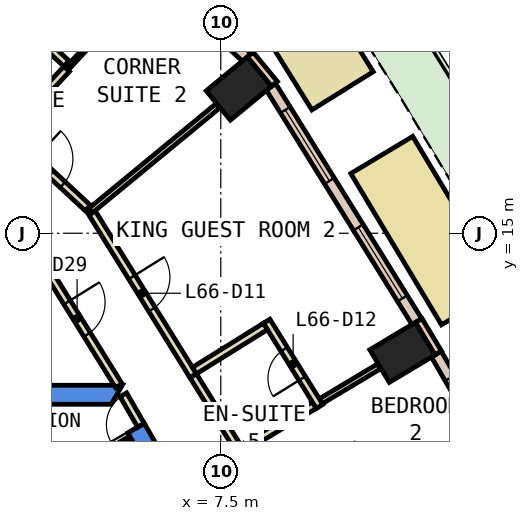
"""IFC4 building model, lengths in metres.
Left out: names, types, materials, properties, quantities, classifications, styles, units other than length and angle.
Written with IfcOpenShell. Run it as: python <this file> out.ifc"""

import sys

from ifc_helpers import new_model, si_unit, direction, frame, frame_2d, origin, origin_2d, place, context, subcontext, project, spatial, polyline, rectangle, outline, extrude, element, fill, save


model = new_model("IFC4")
c1 = context("Model", 3, precision=1e-05, world=origin(), true_north=direction((0.0, 1.0)))
c2 = subcontext(c1, "Body", "Model", "MODEL_VIEW")
j1 = project(units=[si_unit("LENGTHUNIT", "METRE"), si_unit("PLANEANGLEUNIT", "RADIAN")], contexts=[c1])
p1 = place(None, origin())
s1 = spatial("IfcSite", under=j1, at=p1, CompositionType="ELEMENT")
p2 = place(p1, origin())
s2 = spatial("IfcBuilding", under=s1, at=p2, CompositionType="ELEMENT")
p3 = place(p2, frame((0.0, 0.0, 286.4)))
s3 = spatial("IfcBuildingStorey", under=s2, at=p3, CompositionType="ELEMENT", Elevation=286.4)
for number, where, z_axis, x_axis in (
    (1, (12.279, 11.865, 0.0), (0.0, 0.0, 1.0), (-0.514, 0.858, 0.0)),
    (2, (7.975, 18.807, 0.0), (0.0, 0.0, 1.0), (-0.636, 0.772, 0.0)),
):
    element("IfcColumn", number, at=place(p3, frame(where, z_axis=z_axis, x_axis=x_axis)), inside=s3, PredefinedType="COLUMN", context=c2, shape_type="SweptSolid", body=[
        extrude(rectangle(XDim=1.0, YDim=1.4, at=origin_2d()), origin(), (0.0, 0.0, 1.0), 3.26),
    ])
p4 = place(p3, frame((0.0, 0.0, -0.6)))
e3 = element("IfcWall", 3, at=p4, inside=s3, PredefinedType="SHEAR", context=c2, shape_type="SweptSolid", body=[
    extrude(outline(polyline([(5.486, 9.998), (5.053, 9.748), (9.238, 2.5), (9.815, 2.5), (5.486, 9.998)])), origin(), (0.0, 0.0, 1.0), 3.86),
])
p5 = place(p3, frame((0.0, 0.0, -0.6)))
e4 = element("IfcWall", 4, at=p5, inside=s3, PredefinedType="SHEAR", context=c2, shape_type="SweptSolid", body=[
    extrude(outline(polyline([(4.907, 11.0), (-4.907, 11.0), (-4.619, 10.5), (4.619, 10.5), (4.907, 11.0)])), origin(), (0.0, 0.0, 1.0), 3.86),
])
for number, where, z_axis, x_axis in (
    (5, (13.222, 11.848, 0.0), (0.0, 0.0, 1.0), (-0.514, 0.858, 0.0)),
    (6, (8.911, 18.929, 0.0), (0.0, 0.0, 1.0), (-0.636, 0.772, 0.0)),
):
    element("IfcWall", number, at=place(p3, frame(where, z_axis=z_axis, x_axis=x_axis)), inside=s3, PredefinedType="STANDARD", context=c2, shape_type="SweptSolid", body=[
        extrude(rectangle(XDim=1.0, YDim=0.2, at=frame_2d((0.5, 0.0))), origin(), (0.0, 0.0, 1.0), 3.26),
    ])
p6 = place(p3, frame((16.821, 5.498, 0.0), z_axis=(0.0, 0.0, 1.0), x_axis=(-0.499945412946, 0.866056917341, 0.0)))
e7 = element("IfcWall", 7, at=p6, inside=s3, PredefinedType="STANDARD", context=c2, shape_type="SweptSolid", body=[
    extrude(rectangle(XDim=7.299, YDim=0.3, at=frame_2d((3.649, 0.0))), origin(), (0.0, 0.0, 1.0), 3.26),
])
p7 = place(p6, frame((0.825, 0.0, 0.0)))
e8 = element("IfcOpeningElement", 8, at=p7, cuts=e7, PredefinedType="OPENING", context=c2, shape_type="SweptSolid", body=[
    extrude(rectangle(XDim=2.0, YDim=2.4, at=frame_2d((1.0, 1.2))), frame((0.0, 0.16, 0.0), z_axis=(0.0, -1.0, 0.0), x_axis=(1.0, 0.0, 0.0)), (0.0, 0.0, 1.0), 0.32),
])
p8 = place(p6, frame((4.374, 0.0, 0.9)))
e9 = element("IfcOpeningElement", 9, at=p8, cuts=e7, PredefinedType="OPENING", context=c2, shape_type="SweptSolid", body=[
    extrude(rectangle(XDim=2.2, YDim=2.0, at=frame_2d((1.1, 1.0))), frame((0.0, 0.16, 0.0), z_axis=(0.0, -1.0, 0.0), x_axis=(1.0, 0.0, 0.0)), (0.0, 0.0, 1.0), 0.32),
])
p9 = place(p3, frame((12.659, 12.675, 0.0), z_axis=(0.0, 0.0, 1.0), x_axis=(-0.527762071678, 0.849392250788, 0.0)))
e10 = element("IfcWall", 10, at=p9, inside=s3, PredefinedType="STANDARD", context=c2, shape_type="SweptSolid", body=[
    extrude(rectangle(XDim=7.276, YDim=0.3, at=frame_2d((3.638, 0.0))), origin(), (0.0, 0.0, 1.0), 3.26),
])
p10 = place(p9, frame((0.719, 0.0, 0.9)))
e11 = element("IfcOpeningElement", 11, at=p10, cuts=e10, PredefinedType="OPENING", context=c2, shape_type="SweptSolid", body=[
    extrude(rectangle(XDim=2.2, YDim=2.0, at=frame_2d((1.1, 1.0))), frame((0.0, 0.16, 0.0), z_axis=(0.0, -1.0, 0.0), x_axis=(1.0, 0.0, 0.0)), (0.0, 0.0, 1.0), 0.32),
])
p11 = place(p9, frame((4.357, 0.0, 0.9)))
e12 = element("IfcOpeningElement", 12, at=p11, cuts=e10, PredefinedType="OPENING", context=c2, shape_type="SweptSolid", body=[
    extrude(rectangle(XDim=2.2, YDim=2.0, at=frame_2d((1.1, 1.0))), frame((0.0, 0.16, 0.0), z_axis=(0.0, -1.0, 0.0), x_axis=(1.0, 0.0, 0.0)), (0.0, 0.0, 1.0), 0.32),
])
p12 = place(p3, frame((8.184, 19.626, 0.0), z_axis=(0.0, 0.0, 1.0), x_axis=(-0.732397380344, 0.680877431896, 0.0)))
e13 = element("IfcWall", 13, at=p12, inside=s3, PredefinedType="STANDARD", context=c2, shape_type="SweptSolid", body=[
    extrude(rectangle(XDim=4.019, YDim=0.3, at=frame_2d((2.009, 0.0))), origin(), (0.0, 0.0, 1.0), 3.26),
])
p13 = place(p12, frame((1.309, 0.0, 0.9)))
e14 = element("IfcOpeningElement", 14, at=p13, cuts=e13, PredefinedType="OPENING", context=c2, shape_type="SweptSolid", body=[
    extrude(rectangle(XDim=1.4, YDim=2.0, at=frame_2d((0.7, 1.0))), frame((0.0, 0.16, 0.0), z_axis=(0.0, -1.0, 0.0), x_axis=(1.0, 0.0, 0.0)), (0.0, 0.0, 1.0), 0.32),
])
p14 = place(p3, frame((14.123, 13.079, 0.0), z_axis=(0.0, 0.0, 1.0), x_axis=(-0.514333285091, 0.857590386984, 0.0)))
e15 = element("IfcWall", 15, at=p14, inside=s3, PredefinedType="STANDARD", context=c2, shape_type="SweptSolid", body=[
    extrude(rectangle(XDim=4.641, YDim=1.9, at=frame_2d((2.32, 0.0))), origin(), (0.0, 0.0, 1.0), 0.8),
])
p15 = place(p3, frame((10.704, 18.747, 0.0), z_axis=(0.0, 0.0, 1.0), x_axis=(-0.528631074262, 0.848851687472, 0.0)))
e16 = element("IfcWall", 16, at=p15, inside=s3, PredefinedType="STANDARD", context=c2, shape_type="SweptSolid", body=[
    extrude(rectangle(XDim=4.799, YDim=1.9, at=frame_2d((2.4, 0.0))), origin(), (0.0, 0.0, 1.0), 0.8),
])
p16 = place(p3, frame((2.62, 14.526, 0.0), z_axis=(0.0, 0.0, 1.0), x_axis=(0.527726136463, -0.84941457775, 0.0)))
e17 = element("IfcWall", 17, at=p16, inside=s3, PredefinedType="PARTITIONING", context=c2, shape_type="SweptSolid", body=[
    extrude(rectangle(XDim=4.165, YDim=0.2, at=frame_2d((2.083, 0.0))), origin(), (0.0, 0.0, 1.0), 2.4),
])
p17 = place(p16, frame((1.583, 0.0, 0.0)))
e18 = element("IfcOpeningElement", 18, at=p17, cuts=e17, PredefinedType="OPENING", context=c2, shape_type="SweptSolid", body=[
    extrude(rectangle(XDim=1.0, YDim=2.1, at=frame_2d((0.5, 1.05))), frame((0.0, 0.11, 0.0), z_axis=(0.0, -1.0, 0.0), x_axis=(1.0, 0.0, 0.0)), (0.0, 0.0, 1.0), 0.22),
])
p18 = place(p3, frame((4.022, 15.68, 0.0), z_axis=(0.0, 0.0, 1.0), x_axis=(0.527737948498, -0.849407239029, 0.0)))
e19 = element("IfcWall", 19, at=p18, inside=s3, PredefinedType="PARTITIONING", context=c2, shape_type="SweptSolid", body=[
    extrude(rectangle(XDim=5.217, YDim=0.2, at=frame_2d((2.608, 0.0))), origin(), (0.0, 0.0, 1.0), 3.26),
])
p19 = place(p18, frame((2.159, 0.0, 0.0)))
e20 = element("IfcOpeningElement", 20, at=p19, cuts=e19, PredefinedType="OPENING", context=c2, shape_type="SweptSolid", body=[
    extrude(rectangle(XDim=1.0, YDim=2.1, at=frame_2d((0.5, 1.05))), frame((0.0, 0.11, 0.0), z_axis=(0.0, -1.0, 0.0), x_axis=(1.0, 0.0, 0.0)), (0.0, 0.0, 1.0), 0.22),
])
p20 = place(p3, frame((6.775, 11.249, 0.0), z_axis=(0.0, 0.0, 1.0), x_axis=(0.527803270752, -0.849366650736, 0.0)))
e21 = element("IfcWall", 21, at=p20, inside=s3, PredefinedType="PARTITIONING", context=c2, shape_type="SweptSolid", body=[
    extrude(rectangle(XDim=2.401, YDim=0.2, at=frame_2d((1.2, 0.0))), origin(), (0.0, 0.0, 1.0), 3.26),
])
p21 = place(p3, frame((1.949, 17.572, 0.0), z_axis=(0.0, 0.0, 1.0), x_axis=(0.732331154554, -0.680948661846, 0.0)))
e22 = element("IfcWall", 22, at=p21, inside=s3, PredefinedType="PARTITIONING", context=c2, shape_type="SweptSolid", body=[
    extrude(rectangle(XDim=2.803, YDim=0.2, at=frame_2d((1.402, 0.0))), origin(), (0.0, 0.0, 1.0), 3.26),
])
p22 = place(p21, frame((0.901, 0.0, 0.0)))
e23 = element("IfcOpeningElement", 23, at=p22, cuts=e22, PredefinedType="OPENING", context=c2, shape_type="SweptSolid", body=[
    extrude(rectangle(XDim=1.0, YDim=2.1, at=frame_2d((0.5, 1.05))), frame((0.0, 0.11, 0.0), z_axis=(0.0, -1.0, 0.0), x_axis=(1.0, 0.0, 0.0)), (0.0, 0.0, 1.0), 0.22),
])
p23 = place(p3, frame((10.133, 10.58, 0.0), z_axis=(0.0, 0.0, 1.0), x_axis=(0.857903919212, 0.513810145287, 0.0)))
e24 = element("IfcWall", 24, at=p23, inside=s3, PredefinedType="PARTITIONING", context=c2, shape_type="SweptSolid", body=[
    extrude(rectangle(XDim=1.781, YDim=0.15, at=frame_2d((0.891, 0.0))), origin(), (0.0, 0.0, 1.0), 3.26),
])
p24 = place(p3, frame((7.989, 9.295, 0.0), z_axis=(0.0, 0.0, 1.0), x_axis=(0.857801856135, 0.513980520654, 0.0)))
e25 = element("IfcWall", 25, at=p24, inside=s3, PredefinedType="PARTITIONING", context=c2, shape_type="SweptSolid", body=[
    extrude(rectangle(XDim=2.3, YDim=0.2, at=frame_2d((1.15, 0.0))), origin(), (0.0, 0.0, 1.0), 3.26),
])
p25 = place(p3, frame((10.1, 10.443, 0.0), z_axis=(0.0, 0.0, 1.0), x_axis=(-0.527510239672, 0.849548672555, 0.0)))
e26 = element("IfcWall", 26, at=p25, inside=s3, PredefinedType="PARTITIONING", context=c2, shape_type="SweptSolid", body=[
    extrude(rectangle(XDim=2.639, YDim=0.2, at=frame_2d((1.319, 0.0))), origin(), (0.0, 0.0, 1.0), 3.26),
])
p26 = place(p25, frame((0.869, 0.0, 0.0)))
e27 = element("IfcOpeningElement", 27, at=p26, cuts=e26, PredefinedType="OPENING", context=c2, shape_type="SweptSolid", body=[
    extrude(rectangle(XDim=0.9, YDim=2.1, at=frame_2d((0.45, 1.05))), frame((0.0, 0.11, 0.0), z_axis=(0.0, -1.0, 0.0), x_axis=(1.0, 0.0, 0.0)), (0.0, 0.0, 1.0), 0.22),
])
p27 = place(p3, frame((8.676, 12.548, 0.0), z_axis=(0.0, 0.0, 1.0), x_axis=(-0.849286670427, -0.527931957202, 0.0)))
e28 = element("IfcWall", 28, at=p27, inside=s3, PredefinedType="PARTITIONING", context=c2, shape_type="SweptSolid", body=[
    extrude(rectangle(XDim=2.199, YDim=0.2, at=frame_2d((1.1, 0.0))), origin(), (0.0, 0.0, 1.0), 3.26),
])
p28 = place(p3, frame((4.075, 15.595, 0.0), z_axis=(0.0, 0.0, 1.0), x_axis=(0.771899326406, 0.635744783616, 0.0)))
e29 = element("IfcWall", 29, at=p28, inside=s3, PredefinedType="PARTITIONING", context=c2, shape_type="SweptSolid", body=[
    extrude(rectangle(XDim=4.332, YDim=0.15, at=frame_2d((2.166, 0.0))), origin(), (0.0, 0.0, 1.0), 3.26),
])
p29 = place(p3, frame((3.444, 19.322, 0.0), z_axis=(0.0, 0.0, 1.0), x_axis=(0.68085394361, 0.732419215662, 0.0)))
e30 = element("IfcWall", 30, at=p29, inside=s3, PredefinedType="PARTITIONING", context=c2, shape_type="SweptSolid", body=[
    extrude(rectangle(XDim=3.3, YDim=0.1, at=frame_2d((1.65, 0.0))), origin(), (0.0, 0.0, 1.0), 3.26),
])
p30 = place(p29, frame((1.2, 0.0, 0.0)))
e31 = element("IfcOpeningElement", 31, at=p30, cuts=e30, PredefinedType="OPENING", context=c2, shape_type="SweptSolid", body=[
    extrude(rectangle(XDim=0.9, YDim=2.1, at=frame_2d((0.45, 1.05))), frame((0.0, 0.06, 0.0), z_axis=(0.0, -1.0, 0.0), x_axis=(1.0, 0.0, 0.0)), (0.0, 0.0, 1.0), 0.12),
])
p31 = place(p3, frame((1.776, 17.528, 0.0), z_axis=(0.0, 0.0, 1.0), x_axis=(0.680978439741, 0.732303464834, 0.0)))
e32 = element("IfcWall", 32, at=p31, inside=s3, PredefinedType="PARTITIONING", context=c2, shape_type="SweptSolid", body=[
    extrude(rectangle(XDim=2.45, YDim=0.2, at=frame_2d((1.225, 0.0))), origin(), (0.0, 0.0, 1.0), 3.26),
])
p32 = place(p3, frame((3.439, 19.464, 0.0), z_axis=(0.0, 0.0, 1.0), x_axis=(-0.732491549411, 0.68077612329, 0.0)))
e33 = element("IfcWall", 33, at=p32, inside=s3, PredefinedType="PARTITIONING", context=c2, shape_type="SweptSolid", body=[
    extrude(rectangle(XDim=1.699, YDim=0.2, at=frame_2d((0.85, 0.0))), origin(), (0.0, 0.0, 1.0), 3.26),
])
p33 = place(p3, frame((5.399, 9.948, 0.0), z_axis=(0.0, 0.0, 1.0), x_axis=(-0.499882215713, 0.866093395895, 0.0)))
e34 = element("IfcWall", 34, at=p33, inside=s3, PredefinedType="PARTITIONING", context=c2, shape_type="SweptSolid", body=[
    extrude(rectangle(XDim=0.926, YDim=0.2, at=frame_2d((0.463, 0.0))), origin(), (0.0, 0.0, 1.0), 2.4),
])
p34 = place(p33, frame((0.017, 0.0, 0.0)))
e35 = element("IfcOpeningElement", 35, at=p34, cuts=e34, PredefinedType="OPENING", context=c2, shape_type="SweptSolid", body=[
    extrude(rectangle(XDim=0.9, YDim=2.1, at=frame_2d((0.45, 1.05))), frame((0.0, 0.11, 0.0), z_axis=(0.0, -1.0, 0.0), x_axis=(1.0, 0.0, 0.0)), (0.0, 0.0, 1.0), 0.22),
])
p35 = place(p3, frame((2.7, 8.158, 0.0), z_axis=(0.0, 0.0, 1.0), x_axis=(0.86611865017, 0.499838457731, 0.0)))
e36 = element("IfcWall", 36, at=p35, inside=s3, PredefinedType="STANDARD", context=c2, shape_type="SweptSolid", body=[
    extrude(rectangle(XDim=2.733, YDim=0.2, at=frame_2d((1.366, 0.0))), origin(), (0.0, 0.0, 1.0), 3.26),
])
p36 = place(p8, origin())
e37 = element("IfcWindow", 37, at=p36, inside=s3, PartitioningType="SINGLE_PANEL", PredefinedType="WINDOW", context=c2, shape_type="SweptSolid", body=[
    extrude(rectangle(XDim=2.2, YDim=2.0, at=frame_2d((1.1, 1.0))), frame((0.0, 0.03, 0.0), z_axis=(0.0, -1.0, 0.0), x_axis=(1.0, 0.0, 0.0)), (0.0, 0.0, 1.0), 0.06),
])
fill(e9, e37)
p37 = place(p10, origin())
e38 = element("IfcWindow", 38, at=p37, inside=s3, PartitioningType="SINGLE_PANEL", PredefinedType="WINDOW", context=c2, shape_type="SweptSolid", body=[
    extrude(rectangle(XDim=2.2, YDim=2.0, at=frame_2d((1.1, 1.0))), frame((0.0, 0.03, 0.0), z_axis=(0.0, -1.0, 0.0), x_axis=(1.0, 0.0, 0.0)), (0.0, 0.0, 1.0), 0.06),
])
fill(e11, e38)
p38 = place(p11, origin())
e39 = element("IfcWindow", 39, at=p38, inside=s3, PartitioningType="SINGLE_PANEL", PredefinedType="WINDOW", context=c2, shape_type="SweptSolid", body=[
    extrude(rectangle(XDim=2.2, YDim=2.0, at=frame_2d((1.1, 1.0))), frame((0.0, 0.03, 0.0), z_axis=(0.0, -1.0, 0.0), x_axis=(1.0, 0.0, 0.0)), (0.0, 0.0, 1.0), 0.06),
])
fill(e12, e39)
p39 = place(p19, origin())
e40 = element("IfcDoor", 40, at=p39, inside=s3, OperationType="SINGLE_SWING_LEFT", PredefinedType="DOOR", context=c2, shape_type="SweptSolid", body=[
    extrude(rectangle(XDim=1.0, YDim=2.1, at=frame_2d((0.5, 1.05))), frame((0.0, 0.025, 0.0), z_axis=(0.0, -1.0, 0.0), x_axis=(1.0, 0.0, 0.0)), (0.0, 0.0, 1.0), 0.05),
])
fill(e20, e40)
p40 = place(p26, origin())
e41 = element("IfcDoor", 41, at=p40, inside=s3, OperationType="SINGLE_SWING_LEFT", PredefinedType="DOOR", context=c2, shape_type="SweptSolid", body=[
    extrude(rectangle(XDim=0.9, YDim=2.1, at=frame_2d((0.45, 1.05))), frame((0.0, 0.025, 0.0), z_axis=(0.0, -1.0, 0.0), x_axis=(1.0, 0.0, 0.0)), (0.0, 0.0, 1.0), 0.05),
])
fill(e27, e41)
p41 = place(p22, origin())
e42 = element("IfcDoor", 42, at=p41, inside=s3, OperationType="SINGLE_SWING_LEFT", PredefinedType="DOOR", context=c2, shape_type="SweptSolid", body=[
    extrude(rectangle(XDim=1.0, YDim=2.1, at=frame_2d((0.5, 1.05))), frame((0.0, 0.025, 0.0), z_axis=(0.0, -1.0, 0.0), x_axis=(1.0, 0.0, 0.0)), (0.0, 0.0, 1.0), 0.05),
])
fill(e23, e42)
p42 = place(p17, origin())
e43 = element("IfcDoor", 43, at=p42, inside=s3, OperationType="SINGLE_SWING_RIGHT", PredefinedType="DOOR", context=c2, shape_type="SweptSolid", body=[
    extrude(rectangle(XDim=1.0, YDim=2.1, at=frame_2d((0.5, 1.05))), frame((0.0, 0.025, 0.0), z_axis=(0.0, -1.0, 0.0), x_axis=(1.0, 0.0, 0.0)), (0.0, 0.0, 1.0), 0.05),
])
fill(e18, e43)
p43 = place(p34, origin())
e44 = element("IfcDoor", 44, at=p43, inside=s3, OperationType="SINGLE_SWING_LEFT", PredefinedType="DOOR", context=c2, shape_type="SweptSolid", body=[
    extrude(rectangle(XDim=0.9, YDim=2.1, at=frame_2d((0.45, 1.05))), frame((0.0, 0.025, 0.0), z_axis=(0.0, -1.0, 0.0), x_axis=(1.0, 0.0, 0.0)), (0.0, 0.0, 1.0), 0.05),
])
fill(e35, e44)
save(model, sys.argv[1])
